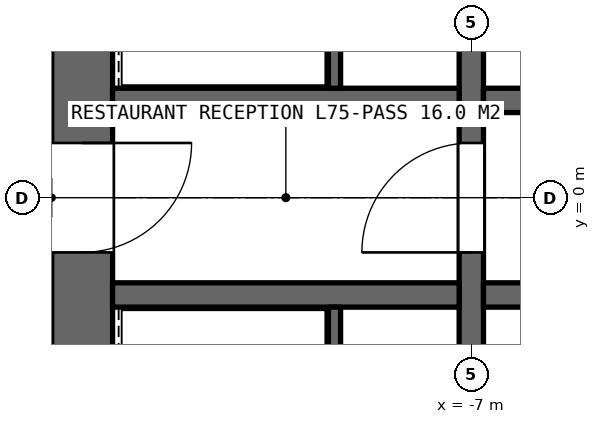
"""IFC4 building model, lengths in metres.
Left out: names, types, materials, properties, quantities, classifications, styles, units other than length and angle.
Written with IfcOpenShell. Run it as: python <this file> out.ifc"""

import sys

from ifc_helpers import new_model, si_unit, direction, frame, frame_2d, origin, place, context, subcontext, project, spatial, rectangle, extrude, element, fill, save


model = new_model("IFC4")
c1 = context("Model", 3, precision=1e-05, world=origin(), true_north=direction((0.0, 1.0)))
c2 = subcontext(c1, "Body", "Model", "MODEL_VIEW")
j1 = project(units=[si_unit("LENGTHUNIT", "METRE"), si_unit("PLANEANGLEUNIT", "RADIAN")], contexts=[c1])
p1 = place(None, origin())
s1 = spatial("IfcSite", under=j1, at=p1, CompositionType="ELEMENT")
p2 = place(p1, origin())
s2 = spatial("IfcBuilding", under=s1, at=p2, CompositionType="ELEMENT")
p3 = place(p2, frame((0.0, 0.0, 334.2)))
s3 = spatial("IfcBuildingStorey", under=s2, at=p3, CompositionType="ELEMENT", Elevation=334.2)
p4 = place(p3, frame((-13.4, 8.9, 0.0), z_axis=(0.0, 0.0, 1.0), x_axis=(0.0, -1.0, 0.0)))
e1 = element("IfcWall", 1, at=p4, inside=s3, PredefinedType="SHEAR", context=c2, shape_type="SweptSolid", body=[
    extrude(rectangle(XDim=17.8, YDim=1.0, at=frame_2d((8.9, 0.0))), origin(), (0.0, 0.0, 1.0), 5.0),
])
p5 = place(p4, frame((8.0, 0.0, 0.0)))
e2 = element("IfcOpeningElement", 2, at=p5, cuts=e1, PredefinedType="OPENING", context=c2, shape_type="SweptSolid", body=[
    extrude(rectangle(XDim=1.8, YDim=2.4, at=frame_2d((0.9, 1.2))), frame((0.0, 0.51, 0.0), z_axis=(0.0, -1.0, 0.0), x_axis=(1.0, 0.0, 0.0)), (0.0, 0.0, 1.0), 1.02),
])
p6 = place(p4, frame((16.6, 0.0, 0.0)))
e3 = element("IfcOpeningElement", 3, at=p6, cuts=e1, PredefinedType="OPENING", context=c2, shape_type="SweptSolid", body=[
    extrude(rectangle(XDim=1.0, YDim=2.4, at=frame_2d((0.5, 1.2))), frame((0.0, 0.51, 0.0), z_axis=(0.0, -1.0, 0.0), x_axis=(1.0, 0.0, 0.0)), (0.0, 0.0, 1.0), 1.02),
])
p7 = place(p3, frame((-7.0, -8.9, 0.0), z_axis=(0.0, 0.0, 1.0), x_axis=(0.0, 1.0, 0.0)))
e4 = element("IfcWall", 4, at=p7, inside=s3, PredefinedType="SHEAR", context=c2, shape_type="SweptSolid", body=[
    extrude(rectangle(XDim=17.8, YDim=0.4, at=frame_2d((8.9, 0.0))), origin(), (0.0, 0.0, 1.0), 5.0),
])
p8 = place(p7, frame((8.0, 0.0, 0.0)))
e5 = element("IfcOpeningElement", 5, at=p8, cuts=e4, PredefinedType="OPENING", context=c2, shape_type="SweptSolid", body=[
    extrude(rectangle(XDim=1.8, YDim=2.4, at=frame_2d((0.9, 1.2))), frame((0.0, 0.21, 0.0), z_axis=(0.0, -1.0, 0.0), x_axis=(1.0, 0.0, 0.0)), (0.0, 0.0, 1.0), 0.42),
])
p9 = place(p3, frame((-6.8, 1.6, 0.0), z_axis=(0.0, 0.0, 1.0), x_axis=(1.0, 0.0, 0.0)))
e6 = element("IfcWall", 6, at=p9, inside=s3, PredefinedType="SHEAR", context=c2, shape_type="SweptSolid", body=[
    extrude(rectangle(XDim=13.6, YDim=0.4, at=frame_2d((6.8, 0.0))), origin(), (0.0, 0.0, 1.0), 5.0),
])
p10 = place(p9, frame((2.365, 0.0, 0.0)))
e7 = element("IfcOpeningElement", 7, at=p10, cuts=e6, PredefinedType="OPENING", context=c2, shape_type="SweptSolid", body=[
    extrude(rectangle(XDim=1.0, YDim=2.4, at=frame_2d((0.5, 1.2))), frame((0.0, 0.21, 0.0), z_axis=(0.0, -1.0, 0.0), x_axis=(1.0, 0.0, 0.0)), (0.0, 0.0, 1.0), 0.42),
])
p11 = place(p9, frame((7.835, 0.0, 0.0)))
e8 = element("IfcOpeningElement", 8, at=p11, cuts=e6, PredefinedType="OPENING", context=c2, shape_type="SweptSolid", body=[
    extrude(rectangle(XDim=1.0, YDim=2.4, at=frame_2d((0.5, 1.2))), frame((0.0, 0.21, 0.0), z_axis=(0.0, -1.0, 0.0), x_axis=(1.0, 0.0, 0.0)), (0.0, 0.0, 1.0), 0.42),
])
p12 = place(p9, frame((11.95, 0.0, 0.0)))
e9 = element("IfcOpeningElement", 9, at=p12, cuts=e6, PredefinedType="OPENING", context=c2, shape_type="SweptSolid", body=[
    extrude(rectangle(XDim=0.9, YDim=2.4, at=frame_2d((0.45, 1.2))), frame((0.0, 0.21, 0.0), z_axis=(0.0, -1.0, 0.0), x_axis=(1.0, 0.0, 0.0)), (0.0, 0.0, 1.0), 0.42),
])
p13 = place(p3, frame((-6.8, -1.6, 0.0), z_axis=(0.0, 0.0, 1.0), x_axis=(1.0, 0.0, 0.0)))
e10 = element("IfcWall", 10, at=p13, inside=s3, PredefinedType="SHEAR", context=c2, shape_type="SweptSolid", body=[
    extrude(rectangle(XDim=13.6, YDim=0.4, at=frame_2d((6.8, 0.0))), origin(), (0.0, 0.0, 1.0), 5.0),
])
p14 = place(p13, frame((11.95, 0.0, 0.0)))
e11 = element("IfcOpeningElement", 11, at=p14, cuts=e10, PredefinedType="OPENING", context=c2, shape_type="SweptSolid", body=[
    extrude(rectangle(XDim=0.9, YDim=2.4, at=frame_2d((0.45, 1.2))), frame((0.0, 0.21, 0.0), z_axis=(0.0, -1.0, 0.0), x_axis=(1.0, 0.0, 0.0)), (0.0, 0.0, 1.0), 0.42),
])
p15 = place(p13, frame((4.5, 0.0, 0.0)))
e12 = element("IfcOpeningElement", 12, at=p15, cuts=e10, PredefinedType="OPENING", context=c2, shape_type="SweptSolid", body=[
    extrude(rectangle(XDim=1.8, YDim=2.4, at=frame_2d((0.9, 1.2))), frame((0.0, 0.21, 0.0), z_axis=(0.0, -1.0, 0.0), x_axis=(1.0, 0.0, 0.0)), (0.0, 0.0, 1.0), 0.42),
])
for number, where, z_axis, x_axis in (
    (13, (-12.9, 1.6, 0.0), (0.0, 0.0, 1.0), (1.0, 0.0, 0.0)),
    (14, (-12.9, -1.6, 0.0), (0.0, 0.0, 1.0), (1.0, 0.0, 0.0)),
):
    element("IfcWall", number, at=place(p3, frame(where, z_axis=z_axis, x_axis=x_axis)), inside=s3, PredefinedType="SHEAR", context=c2, shape_type="SweptSolid", body=[
        extrude(rectangle(XDim=5.7, YDim=0.4, at=frame_2d((2.85, 0.0))), origin(), (0.0, 0.0, 1.0), 5.0),
    ])
for number, where, z_axis, x_axis in (
    (15, (-9.25, 7.2, 0.0), (0.0, 0.0, 1.0), (0.0, -1.0, 0.0)),
    (16, (-9.25, -7.2, 0.0), (0.0, 0.0, 1.0), (0.0, 1.0, 0.0)),
):
    element("IfcWall", number, at=place(p3, frame(where, z_axis=z_axis, x_axis=x_axis)), inside=s3, PredefinedType="SOLIDWALL", context=c2, shape_type="SweptSolid", body=[
        extrude(rectangle(XDim=5.4, YDim=0.2, at=frame_2d((2.7, 0.0))), origin(), (0.0, 0.0, 1.0), 5.0),
    ])
p16 = place(p5, origin())
e17 = element("IfcDoor", 17, at=p16, inside=s3, OperationType="DOUBLE_DOOR_SINGLE_SWING", PredefinedType="DOOR", context=c2, shape_type="SweptSolid", body=[
    extrude(rectangle(XDim=1.8, YDim=2.4, at=frame_2d((0.9, 1.2))), frame((0.0, 0.025, 0.0), z_axis=(0.0, -1.0, 0.0), x_axis=(1.0, 0.0, 0.0)), (0.0, 0.0, 1.0), 0.05),
])
fill(e2, e17)
p17 = place(p8, origin())
e18 = element("IfcDoor", 18, at=p17, inside=s3, OperationType="DOUBLE_DOOR_SINGLE_SWING", PredefinedType="DOOR", context=c2, shape_type="SweptSolid", body=[
    extrude(rectangle(XDim=1.8, YDim=2.4, at=frame_2d((0.9, 1.2))), frame((0.0, 0.025, 0.0), z_axis=(0.0, -1.0, 0.0), x_axis=(1.0, 0.0, 0.0)), (0.0, 0.0, 1.0), 0.05),
])
fill(e5, e18)
save(model, sys.argv[1])
